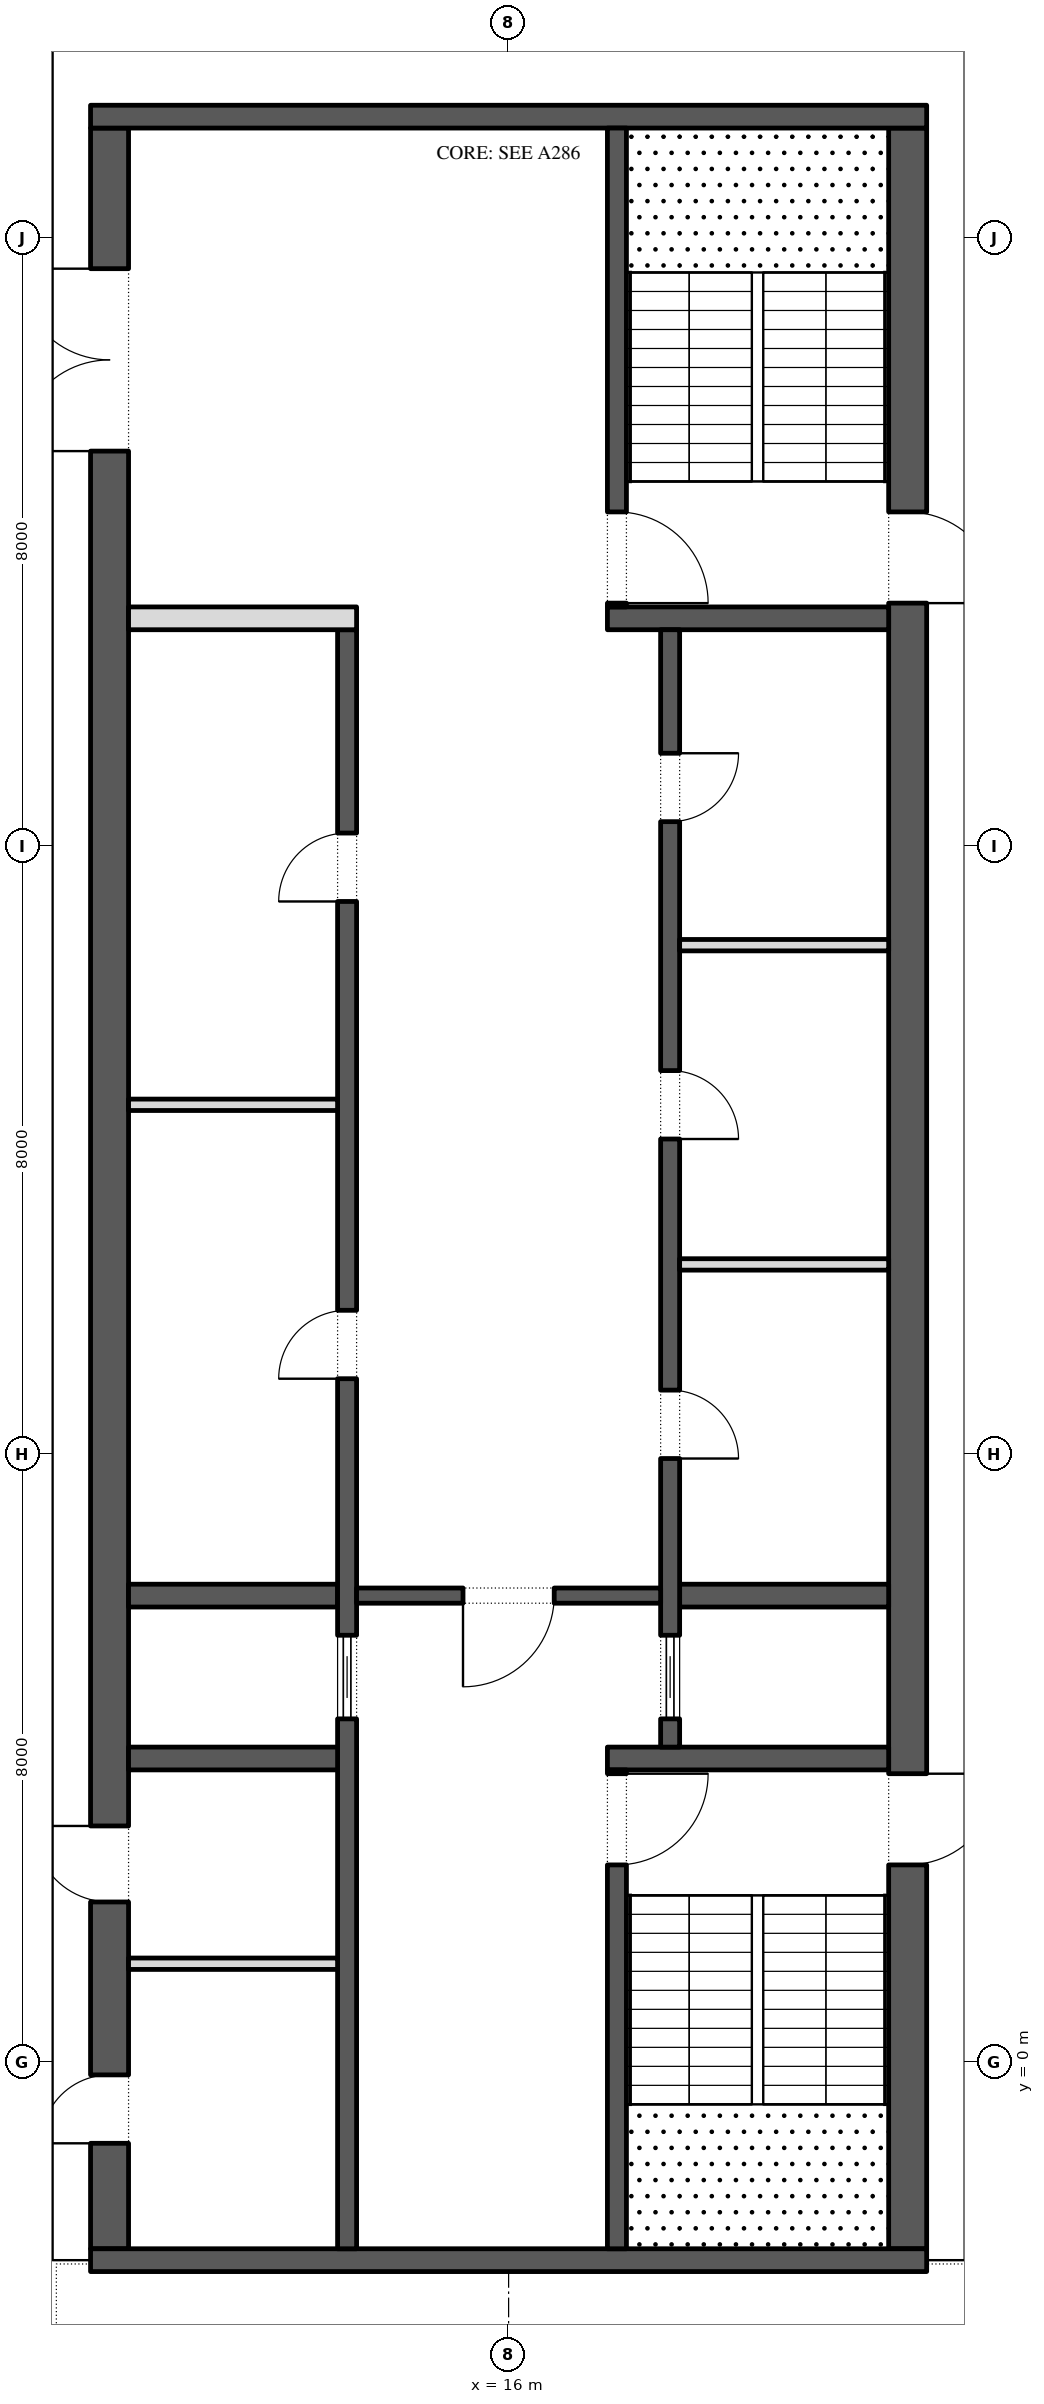
"""IFC4 building model, lengths in metres.
Left out: names, types, materials, properties, quantities, classifications, styles, units other than length and angle.
Written with IfcOpenShell. Run it as: python <this file> out.ifc"""

import sys

from ifc_helpers import new_model, si_unit, direction, frame, frame_2d, origin, place, context, subcontext, project, spatial, rectangle, extrude, element, fill, save


model = new_model("IFC4")
c1 = context("Model", 3, precision=1e-05, world=origin(), true_north=direction((0.0, 1.0)))
c2 = subcontext(c1, "Body", "Model", "MODEL_VIEW")
j1 = project(units=[si_unit("LENGTHUNIT", "METRE"), si_unit("PLANEANGLEUNIT", "RADIAN")], contexts=[c1])
p1 = place(None, origin())
s1 = spatial("IfcSite", under=j1, at=p1, CompositionType="ELEMENT")
p2 = place(p1, origin())
s2 = spatial("IfcBuilding", under=s1, at=p2, CompositionType="ELEMENT")
p3 = place(p2, frame((0.0, 0.0, 377.4)))
s3 = spatial("IfcBuildingStorey", under=s2, at=p3, CompositionType="ELEMENT", Elevation=377.4)
p4 = place(p3, frame((21.25, -2.45, 0.0), z_axis=(0.0, 0.0, 1.0), x_axis=(0.0, 1.0, 0.0)))
e1 = element("IfcWall", 1, at=p4, inside=s3, PredefinedType="SHEAR", context=c2, shape_type="SweptSolid", body=[
    extrude(rectangle(XDim=27.9, YDim=0.5, at=frame_2d((13.95, 0.0))), origin(), (0.0, 0.0, 1.0), 4.0),
])
p5 = place(p4, frame((5.05, 0.0, 0.0)))
e2 = element("IfcOpeningElement", 2, at=p5, cuts=e1, PredefinedType="OPENING", context=c2, shape_type="SweptSolid", body=[
    extrude(rectangle(XDim=1.2, YDim=2.1, at=frame_2d((0.6, 1.05))), frame((0.0, 0.26, 0.0), z_axis=(0.0, -1.0, 0.0), x_axis=(1.0, 0.0, 0.0)), (0.0, 0.0, 1.0), 0.52),
])
p6 = place(p4, frame((21.65, 0.0, 0.0)))
e3 = element("IfcOpeningElement", 3, at=p6, cuts=e1, PredefinedType="OPENING", context=c2, shape_type="SweptSolid", body=[
    extrude(rectangle(XDim=1.2, YDim=2.1, at=frame_2d((0.6, 1.05))), frame((0.0, 0.26, 0.0), z_axis=(0.0, -1.0, 0.0), x_axis=(1.0, 0.0, 0.0)), (0.0, 0.0, 1.0), 0.52),
])
p7 = place(p3, frame((10.75, -2.45, 0.0), z_axis=(0.0, 0.0, 1.0), x_axis=(0.0, 1.0, 0.0)))
e4 = element("IfcWall", 4, at=p7, inside=s3, PredefinedType="SHEAR", context=c2, shape_type="SweptSolid", body=[
    extrude(rectangle(XDim=27.9, YDim=0.5, at=frame_2d((13.95, 0.0))), origin(), (0.0, 0.0, 1.0), 4.0),
])
p8 = place(p7, frame((23.65, 0.0, 0.0)))
e5 = element("IfcOpeningElement", 5, at=p8, cuts=e4, PredefinedType="OPENING", context=c2, shape_type="SweptSolid", body=[
    extrude(rectangle(XDim=2.4, YDim=2.1, at=frame_2d((1.2, 1.05))), frame((0.0, 0.26, 0.0), z_axis=(0.0, -1.0, 0.0), x_axis=(1.0, 0.0, 0.0)), (0.0, 0.0, 1.0), 0.52),
])
p9 = place(p7, frame((1.387, 0.0, 0.0)))
e6 = element("IfcOpeningElement", 6, at=p9, cuts=e4, PredefinedType="OPENING", context=c2, shape_type="SweptSolid", body=[
    extrude(rectangle(XDim=0.9, YDim=2.1, at=frame_2d((0.45, 1.05))), frame((0.0, 0.26, 0.0), z_axis=(0.0, -1.0, 0.0), x_axis=(1.0, 0.0, 0.0)), (0.0, 0.0, 1.0), 0.52),
])
p10 = place(p7, frame((4.562, 0.0, 0.0)))
e7 = element("IfcOpeningElement", 7, at=p10, cuts=e4, PredefinedType="OPENING", context=c2, shape_type="SweptSolid", body=[
    extrude(rectangle(XDim=1.0, YDim=2.1, at=frame_2d((0.5, 1.05))), frame((0.0, 0.26, 0.0), z_axis=(0.0, -1.0, 0.0), x_axis=(1.0, 0.0, 0.0)), (0.0, 0.0, 1.0), 0.52),
])
for number, where, z_axis, x_axis in (
    (8, (10.5, -2.6, 0.0), (0.0, 0.0, 1.0), (1.0, 0.0, 0.0)),
    (9, (10.5, 25.6, 0.0), (0.0, 0.0, 1.0), (1.0, 0.0, 0.0)),
):
    element("IfcWall", number, at=place(p3, frame(where, z_axis=z_axis, x_axis=x_axis)), inside=s3, PredefinedType="SHEAR", context=c2, shape_type="SweptSolid", body=[
        extrude(rectangle(XDim=11.0, YDim=0.3, at=frame_2d((5.5, 0.0))), origin(), (0.0, 0.0, 1.0), 4.0),
    ])
p11 = place(p3, frame((17.3, 4.0, 0.0), z_axis=(0.0, 0.0, 1.0), x_axis=(1.0, 0.0, 0.0)))
e10 = element("IfcWall", 10, at=p11, inside=s3, PredefinedType="SHEAR", context=c2, shape_type="SweptSolid", body=[
    extrude(rectangle(XDim=3.7, YDim=0.3, at=frame_2d((1.85, 0.0))), origin(), (0.0, 0.0, 1.0), 4.0),
])
p12 = place(p3, frame((17.425, -2.45, 0.0), z_axis=(0.0, 0.0, 1.0), x_axis=(0.0, 1.0, 0.0)))
e11 = element("IfcWall", 11, at=p12, inside=s3, PredefinedType="SHEAR", context=c2, shape_type="SweptSolid", body=[
    extrude(rectangle(XDim=6.3, YDim=0.25, at=frame_2d((3.15, 0.0))), origin(), (0.0, 0.0, 1.0), 4.0),
])
p13 = place(p12, frame((5.05, 0.0, 0.0)))
e12 = element("IfcOpeningElement", 12, at=p13, cuts=e11, PredefinedType="OPENING", context=c2, shape_type="SweptSolid", body=[
    extrude(rectangle(XDim=1.2, YDim=2.1, at=frame_2d((0.6, 1.05))), frame((0.0, 0.135, 0.0), z_axis=(0.0, -1.0, 0.0), x_axis=(1.0, 0.0, 0.0)), (0.0, 0.0, 1.0), 0.27),
])
p14 = place(p3, frame((17.3, 19.0, 0.0), z_axis=(0.0, 0.0, 1.0), x_axis=(1.0, 0.0, 0.0)))
e13 = element("IfcWall", 13, at=p14, inside=s3, PredefinedType="SHEAR", context=c2, shape_type="SweptSolid", body=[
    extrude(rectangle(XDim=3.7, YDim=0.3, at=frame_2d((1.85, 0.0))), origin(), (0.0, 0.0, 1.0), 4.0),
])
p15 = place(p3, frame((17.425, 19.15, 0.0), z_axis=(0.0, 0.0, 1.0), x_axis=(0.0, 1.0, 0.0)))
e14 = element("IfcWall", 14, at=p15, inside=s3, PredefinedType="SHEAR", context=c2, shape_type="SweptSolid", body=[
    extrude(rectangle(XDim=6.3, YDim=0.25, at=frame_2d((3.15, 0.0))), origin(), (0.0, 0.0, 1.0), 4.0),
])
p16 = place(p15, frame((0.05, 0.0, 0.0)))
e15 = element("IfcOpeningElement", 15, at=p16, cuts=e14, PredefinedType="OPENING", context=c2, shape_type="SweptSolid", body=[
    extrude(rectangle(XDim=1.2, YDim=2.1, at=frame_2d((0.6, 1.05))), frame((0.0, 0.135, 0.0), z_axis=(0.0, -1.0, 0.0), x_axis=(1.0, 0.0, 0.0)), (0.0, 0.0, 1.0), 0.27),
])
p17 = place(p3, frame((18.25, 6.143, 0.0), z_axis=(0.0, 0.0, 1.0), x_axis=(1.0, 0.0, 0.0)))
e16 = element("IfcWall", 16, at=p17, inside=s3, PredefinedType="SHEAR", context=c2, shape_type="SweptSolid", body=[
    extrude(rectangle(XDim=2.75, YDim=0.3, at=frame_2d((1.375, 0.0))), origin(), (0.0, 0.0, 1.0), 4.0),
])
p18 = place(p3, frame((18.125, 4.15, 0.0), z_axis=(0.0, 0.0, 1.0), x_axis=(0.0, 1.0, 0.0)))
e17 = element("IfcWall", 17, at=p18, inside=s3, PredefinedType="SHEAR", context=c2, shape_type="SweptSolid", body=[
    extrude(rectangle(XDim=14.7, YDim=0.25, at=frame_2d((7.35, 0.0))), origin(), (0.0, 0.0, 1.0), 4.0),
])
p19 = place(p18, frame((3.796, 0.0, 0.0)))
e18 = element("IfcOpeningElement", 18, at=p19, cuts=e17, PredefinedType="OPENING", context=c2, shape_type="SweptSolid", body=[
    extrude(rectangle(XDim=0.9, YDim=2.1, at=frame_2d((0.45, 1.05))), frame((0.0, 0.135, 0.0), z_axis=(0.0, -1.0, 0.0), x_axis=(1.0, 0.0, 0.0)), (0.0, 0.0, 1.0), 0.27),
])
p20 = place(p18, frame((8.0, 0.0, 0.0)))
e19 = element("IfcOpeningElement", 19, at=p20, cuts=e17, PredefinedType="OPENING", context=c2, shape_type="SweptSolid", body=[
    extrude(rectangle(XDim=0.9, YDim=2.1, at=frame_2d((0.45, 1.05))), frame((0.0, 0.135, 0.0), z_axis=(0.0, -1.0, 0.0), x_axis=(1.0, 0.0, 0.0)), (0.0, 0.0, 1.0), 0.27),
])
p21 = place(p18, frame((12.175, 0.0, 0.0)))
e20 = element("IfcOpeningElement", 20, at=p21, cuts=e17, PredefinedType="OPENING", context=c2, shape_type="SweptSolid", body=[
    extrude(rectangle(XDim=0.9, YDim=2.1, at=frame_2d((0.45, 1.05))), frame((0.0, 0.135, 0.0), z_axis=(0.0, -1.0, 0.0), x_axis=(1.0, 0.0, 0.0)), (0.0, 0.0, 1.0), 0.27),
])
p22 = place(p18, frame((0.371, 0.0, 0.0)))
e21 = element("IfcOpeningElement", 21, at=p22, cuts=e17, PredefinedType="OPENING", context=c2, shape_type="SweptSolid", body=[
    extrude(rectangle(XDim=1.1, YDim=2.1, at=frame_2d((0.55, 1.05))), frame((0.0, 0.135, 0.0), z_axis=(0.0, -1.0, 0.0), x_axis=(1.0, 0.0, 0.0)), (0.0, 0.0, 1.0), 0.27),
])
for number, where, z_axis, x_axis in (
    (22, (18.25, 10.5, 0.0), (0.0, 0.0, 1.0), (1.0, 0.0, 0.0)),
    (23, (18.25, 14.7, 0.0), (0.0, 0.0, 1.0), (1.0, 0.0, 0.0)),
):
    element("IfcWall", number, at=place(p3, frame(where, z_axis=z_axis, x_axis=x_axis)), inside=s3, PredefinedType="PARTITIONING", context=c2, shape_type="SweptSolid", body=[
        extrude(rectangle(XDim=2.75, YDim=0.15, at=frame_2d((1.375, 0.0))), origin(), (0.0, 0.0, 1.0), 4.0),
    ])
p23 = place(p3, frame((11.0, 4.0, 0.0), z_axis=(0.0, 0.0, 1.0), x_axis=(1.0, 0.0, 0.0)))
e24 = element("IfcWall", 24, at=p23, inside=s3, PredefinedType="SHEAR", context=c2, shape_type="SweptSolid", body=[
    extrude(rectangle(XDim=3.0, YDim=0.3, at=frame_2d((1.5, 0.0))), origin(), (0.0, 0.0, 1.0), 4.0),
])
p24 = place(p3, frame((11.0, 6.143, 0.0), z_axis=(0.0, 0.0, 1.0), x_axis=(1.0, 0.0, 0.0)))
e25 = element("IfcWall", 25, at=p24, inside=s3, PredefinedType="SHEAR", context=c2, shape_type="SweptSolid", body=[
    extrude(rectangle(XDim=2.75, YDim=0.3, at=frame_2d((1.375, 0.0))), origin(), (0.0, 0.0, 1.0), 4.0),
])
p25 = place(p3, frame((13.875, -2.45, 0.0), z_axis=(0.0, 0.0, 1.0), x_axis=(0.0, 1.0, 0.0)))
e26 = element("IfcWall", 26, at=p25, inside=s3, PredefinedType="SHEAR", context=c2, shape_type="SweptSolid", body=[
    extrude(rectangle(XDim=21.3, YDim=0.25, at=frame_2d((10.65, 0.0))), origin(), (0.0, 0.0, 1.0), 4.0),
])
p26 = place(p25, frame((11.446, 0.0, 0.0)))
e27 = element("IfcOpeningElement", 27, at=p26, cuts=e26, PredefinedType="OPENING", context=c2, shape_type="SweptSolid", body=[
    extrude(rectangle(XDim=0.9, YDim=2.1, at=frame_2d((0.45, 1.05))), frame((0.0, 0.135, 0.0), z_axis=(0.0, -1.0, 0.0), x_axis=(1.0, 0.0, 0.0)), (0.0, 0.0, 1.0), 0.27),
])
p27 = place(p25, frame((17.725, 0.0, 0.0)))
e28 = element("IfcOpeningElement", 28, at=p27, cuts=e26, PredefinedType="OPENING", context=c2, shape_type="SweptSolid", body=[
    extrude(rectangle(XDim=0.9, YDim=2.1, at=frame_2d((0.45, 1.05))), frame((0.0, 0.135, 0.0), z_axis=(0.0, -1.0, 0.0), x_axis=(1.0, 0.0, 0.0)), (0.0, 0.0, 1.0), 0.27),
])
p28 = place(p25, frame((6.971, 0.0, 0.0)))
e29 = element("IfcOpeningElement", 29, at=p28, cuts=e26, PredefinedType="OPENING", context=c2, shape_type="SweptSolid", body=[
    extrude(rectangle(XDim=1.1, YDim=2.1, at=frame_2d((0.55, 1.05))), frame((0.0, 0.135, 0.0), z_axis=(0.0, -1.0, 0.0), x_axis=(1.0, 0.0, 0.0)), (0.0, 0.0, 1.0), 0.27),
])
p29 = place(p3, frame((11.0, 19.0, 0.0), z_axis=(0.0, 0.0, 1.0), x_axis=(1.0, 0.0, 0.0)))
e30 = element("IfcWall", 30, at=p29, inside=s3, PredefinedType="PARTITIONING", context=c2, shape_type="SweptSolid", body=[
    extrude(rectangle(XDim=3.0, YDim=0.3, at=frame_2d((1.5, 0.0))), origin(), (0.0, 0.0, 1.0), 4.0),
])
p30 = place(p3, frame((11.0, 12.6, 0.0), z_axis=(0.0, 0.0, 1.0), x_axis=(1.0, 0.0, 0.0)))
e31 = element("IfcWall", 31, at=p30, inside=s3, PredefinedType="PARTITIONING", context=c2, shape_type="SweptSolid", body=[
    extrude(rectangle(XDim=2.75, YDim=0.15, at=frame_2d((1.375, 0.0))), origin(), (0.0, 0.0, 1.0), 4.0),
])
p31 = place(p3, frame((14.0, 6.143, 0.0), z_axis=(0.0, 0.0, 1.0), x_axis=(1.0, 0.0, 0.0)))
e32 = element("IfcWall", 32, at=p31, inside=s3, PredefinedType="SHEAR", context=c2, shape_type="SweptSolid", body=[
    extrude(rectangle(XDim=4.0, YDim=0.2, at=frame_2d((2.0, 0.0))), origin(), (0.0, 0.0, 1.0), 4.0),
])
p32 = place(p31, frame((1.4, 0.0, 0.0)))
e33 = element("IfcOpeningElement", 33, at=p32, cuts=e32, PredefinedType="OPENING", context=c2, shape_type="SweptSolid", body=[
    extrude(rectangle(XDim=1.2, YDim=2.1, at=frame_2d((0.6, 1.05))), frame((0.0, 0.11, 0.0), z_axis=(0.0, -1.0, 0.0), x_axis=(1.0, 0.0, 0.0)), (0.0, 0.0, 1.0), 0.22),
])
p33 = place(p3, frame((11.0, 1.3, 0.0), z_axis=(0.0, 0.0, 1.0), x_axis=(1.0, 0.0, 0.0)))
e34 = element("IfcWall", 34, at=p33, inside=s3, PredefinedType="PARTITIONING", context=c2, shape_type="SweptSolid", body=[
    extrude(rectangle(XDim=2.75, YDim=0.15, at=frame_2d((1.375, 0.0))), origin(), (0.0, 0.0, 1.0), 4.0),
])
p34 = place(p19, frame((0.9, -0.2, 0.0), z_axis=(0.0, 0.0, 1.0), x_axis=(-1.0, 0.0, 0.0)))
e35 = element("IfcDoor", 35, at=p34, inside=s3, OperationType="SINGLE_SWING_LEFT", PredefinedType="DOOR", context=c2, shape_type="SweptSolid", body=[
    extrude(rectangle(XDim=0.9, YDim=2.1, at=frame_2d((0.45, 1.05))), frame((0.0, -0.075, 0.0), z_axis=(0.0, -1.0, 0.0), x_axis=(1.0, 0.0, 0.0)), (0.0, 0.0, 1.0), 0.05),
])
fill(e18, e35)
p35 = place(p20, frame((0.9, -0.2, 0.0), z_axis=(0.0, 0.0, 1.0), x_axis=(-1.0, 0.0, 0.0)))
e36 = element("IfcDoor", 36, at=p35, inside=s3, OperationType="SINGLE_SWING_LEFT", PredefinedType="DOOR", context=c2, shape_type="SweptSolid", body=[
    extrude(rectangle(XDim=0.9, YDim=2.1, at=frame_2d((0.45, 1.05))), frame((0.0, -0.075, 0.0), z_axis=(0.0, -1.0, 0.0), x_axis=(1.0, 0.0, 0.0)), (0.0, 0.0, 1.0), 0.05),
])
fill(e19, e36)
p36 = place(p21, frame((0.9, -0.2, 0.0), z_axis=(0.0, 0.0, 1.0), x_axis=(-1.0, 0.0, 0.0)))
e37 = element("IfcDoor", 37, at=p36, inside=s3, OperationType="SINGLE_SWING_RIGHT", PredefinedType="DOOR", context=c2, shape_type="SweptSolid", body=[
    extrude(rectangle(XDim=0.9, YDim=2.1, at=frame_2d((0.45, 1.05))), frame((0.0, -0.075, 0.0), z_axis=(0.0, -1.0, 0.0), x_axis=(1.0, 0.0, 0.0)), (0.0, 0.0, 1.0), 0.05),
])
fill(e20, e37)
p37 = place(p22, origin())
e38 = element("IfcDoor", 38, at=p37, inside=s3, OperationType="SLIDING_TO_LEFT", PredefinedType="DOOR", context=c2, shape_type="SweptSolid", body=[
    extrude(rectangle(XDim=1.1, YDim=2.1, at=frame_2d((0.55, 1.05))), frame((0.0, 0.025, 0.0), z_axis=(0.0, -1.0, 0.0), x_axis=(1.0, 0.0, 0.0)), (0.0, 0.0, 1.0), 0.05),
])
fill(e21, e38)
p38 = place(p26, origin())
e39 = element("IfcDoor", 39, at=p38, inside=s3, OperationType="SINGLE_SWING_RIGHT", PredefinedType="DOOR", context=c2, shape_type="SweptSolid", body=[
    extrude(rectangle(XDim=0.9, YDim=2.1, at=frame_2d((0.45, 1.05))), frame((0.0, 0.125, 0.0), z_axis=(0.0, -1.0, 0.0), x_axis=(1.0, 0.0, 0.0)), (0.0, 0.0, 1.0), 0.05),
])
fill(e27, e39)
p39 = place(p27, origin())
e40 = element("IfcDoor", 40, at=p39, inside=s3, OperationType="SINGLE_SWING_RIGHT", PredefinedType="DOOR", context=c2, shape_type="SweptSolid", body=[
    extrude(rectangle(XDim=0.9, YDim=2.1, at=frame_2d((0.45, 1.05))), frame((0.0, 0.125, 0.0), z_axis=(0.0, -1.0, 0.0), x_axis=(1.0, 0.0, 0.0)), (0.0, 0.0, 1.0), 0.05),
])
fill(e28, e40)
p40 = place(p28, origin())
e41 = element("IfcDoor", 41, at=p40, inside=s3, OperationType="SLIDING_TO_LEFT", PredefinedType="DOOR", context=c2, shape_type="SweptSolid", body=[
    extrude(rectangle(XDim=1.1, YDim=2.1, at=frame_2d((0.55, 1.05))), frame((0.0, 0.025, 0.0), z_axis=(0.0, -1.0, 0.0), x_axis=(1.0, 0.0, 0.0)), (0.0, 0.0, 1.0), 0.05),
])
fill(e29, e41)
p41 = place(p32, frame((1.2, 0.0, 0.0), z_axis=(0.0, 0.0, 1.0), x_axis=(-1.0, 0.0, 0.0)))
e42 = element("IfcDoor", 42, at=p41, inside=s3, OperationType="SINGLE_SWING_LEFT", PredefinedType="DOOR", context=c2, shape_type="SweptSolid", body=[
    extrude(rectangle(XDim=1.2, YDim=2.1, at=frame_2d((0.6, 1.05))), frame((0.0, 0.025, 0.0), z_axis=(0.0, -1.0, 0.0), x_axis=(1.0, 0.0, 0.0)), (0.0, 0.0, 1.0), 0.05),
])
fill(e33, e42)
p42 = place(p8, origin())
e43 = element("IfcDoor", 43, at=p42, inside=s3, OperationType="DOUBLE_DOOR_SINGLE_SWING", PredefinedType="DOOR", context=c2, shape_type="SweptSolid", body=[
    extrude(rectangle(XDim=2.4, YDim=2.1, at=frame_2d((1.2, 1.05))), frame((0.0, 0.025, 0.0), z_axis=(0.0, -1.0, 0.0), x_axis=(1.0, 0.0, 0.0)), (0.0, 0.0, 1.0), 0.05),
])
fill(e5, e43)
p43 = place(p13, frame((1.2, 0.0, 0.0), z_axis=(0.0, 0.0, 1.0), x_axis=(-1.0, 0.0, 0.0)))
e44 = element("IfcDoor", 44, at=p43, inside=s3, OperationType="SINGLE_SWING_RIGHT", PredefinedType="DOOR", context=c2, shape_type="SweptSolid", body=[
    extrude(rectangle(XDim=1.2, YDim=2.1, at=frame_2d((0.6, 1.05))), frame((0.0, 0.025, 0.0), z_axis=(0.0, -1.0, 0.0), x_axis=(1.0, 0.0, 0.0)), (0.0, 0.0, 1.0), 0.05),
])
fill(e12, e44)
p44 = place(p5, frame((1.2, 0.0, 0.0), z_axis=(0.0, 0.0, 1.0), x_axis=(-1.0, 0.0, 0.0)))
e45 = element("IfcDoor", 45, at=p44, inside=s3, OperationType="SINGLE_SWING_RIGHT", PredefinedType="DOOR", context=c2, shape_type="SweptSolid", body=[
    extrude(rectangle(XDim=1.2, YDim=2.1, at=frame_2d((0.6, 1.05))), frame((0.0, 0.025, 0.0), z_axis=(0.0, -1.0, 0.0), x_axis=(1.0, 0.0, 0.0)), (0.0, 0.0, 1.0), 0.05),
])
fill(e2, e45)
p45 = place(p16, frame((1.2, 0.0, 0.0), z_axis=(0.0, 0.0, 1.0), x_axis=(-1.0, 0.0, 0.0)))
e46 = element("IfcDoor", 46, at=p45, inside=s3, OperationType="SINGLE_SWING_LEFT", PredefinedType="DOOR", context=c2, shape_type="SweptSolid", body=[
    extrude(rectangle(XDim=1.2, YDim=2.1, at=frame_2d((0.6, 1.05))), frame((0.0, 0.025, 0.0), z_axis=(0.0, -1.0, 0.0), x_axis=(1.0, 0.0, 0.0)), (0.0, 0.0, 1.0), 0.05),
])
fill(e15, e46)
p46 = place(p6, frame((1.2, 0.0, 0.0), z_axis=(0.0, 0.0, 1.0), x_axis=(-1.0, 0.0, 0.0)))
e47 = element("IfcDoor", 47, at=p46, inside=s3, OperationType="SINGLE_SWING_LEFT", PredefinedType="DOOR", context=c2, shape_type="SweptSolid", body=[
    extrude(rectangle(XDim=1.2, YDim=2.1, at=frame_2d((0.6, 1.05))), frame((0.0, 0.025, 0.0), z_axis=(0.0, -1.0, 0.0), x_axis=(1.0, 0.0, 0.0)), (0.0, 0.0, 1.0), 0.05),
])
fill(e3, e47)
p47 = place(p9, origin())
e48 = element("IfcDoor", 48, at=p47, inside=s3, OperationType="SINGLE_SWING_RIGHT", PredefinedType="DOOR", context=c2, shape_type="SweptSolid", body=[
    extrude(rectangle(XDim=0.9, YDim=2.1, at=frame_2d((0.45, 1.05))), frame((0.0, -0.2, 0.0), z_axis=(0.0, -1.0, 0.0), x_axis=(1.0, 0.0, 0.0)), (0.0, 0.0, 1.0), 0.05),
])
fill(e6, e48)
p48 = place(p10, origin())
e49 = element("IfcDoor", 49, at=p48, inside=s3, OperationType="SINGLE_SWING_LEFT", PredefinedType="DOOR", context=c2, shape_type="SweptSolid", body=[
    extrude(rectangle(XDim=1.0, YDim=2.1, at=frame_2d((0.5, 1.05))), frame((0.0, -0.2, 0.0), z_axis=(0.0, -1.0, 0.0), x_axis=(1.0, 0.0, 0.0)), (0.0, 0.0, 1.0), 0.05),
])
fill(e7, e49)
save(model, sys.argv[1])
